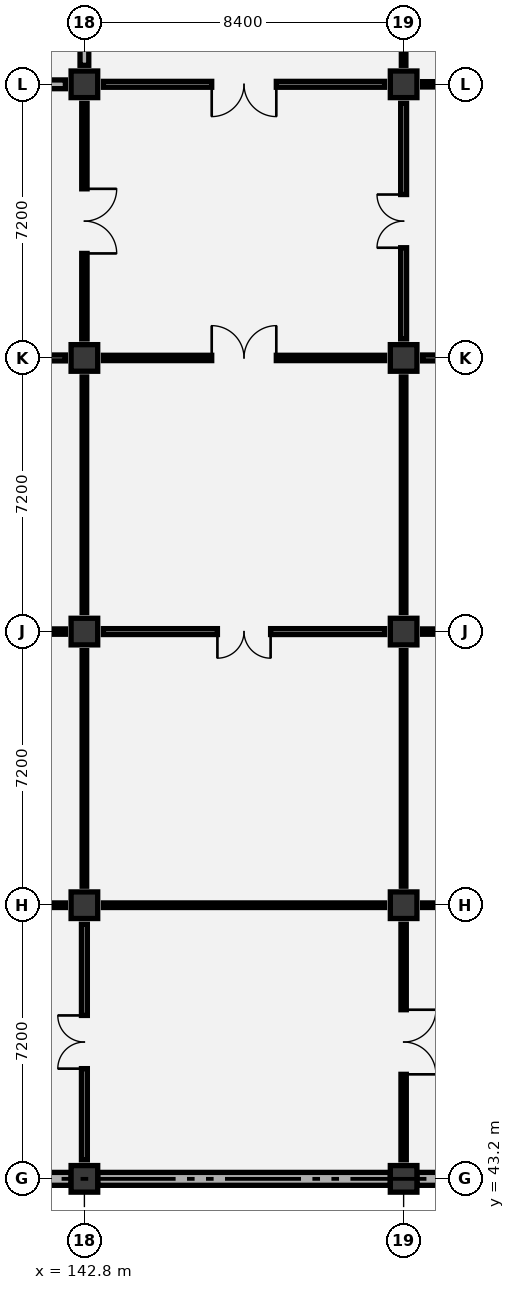
"""IFC4 building model, lengths in metres.
Left out: names, types, materials, properties, quantities, classifications, styles, units other than length and angle.
Written with IfcOpenShell. Run it as: python <this file> out.ifc"""

import sys

from ifc_helpers import new_model, si_unit, direction, frame, frame_2d, origin, origin_2d, place, context, subcontext, project, spatial, rectangle, extrude, element, fill, save


model = new_model("IFC4")
c1 = context("Model", 3, precision=1e-05, world=origin(), true_north=direction((0.0, 1.0)))
c2 = subcontext(c1, "Body", "Model", "MODEL_VIEW")
j1 = project(units=[si_unit("LENGTHUNIT", "METRE"), si_unit("PLANEANGLEUNIT", "RADIAN")], contexts=[c1])
p1 = place(None, origin())
s1 = spatial("IfcSite", under=j1, at=p1, CompositionType="ELEMENT")
p2 = place(p1, origin())
s2 = spatial("IfcBuilding", under=s1, at=p2, CompositionType="ELEMENT")
p3 = place(p2, frame((0.0, 0.0, 6.0)))
s3 = spatial("IfcBuildingStorey", under=s2, at=p3, CompositionType="ELEMENT", Elevation=6.0)
for number, where, z_axis, x_axis in (
    (1, (142.8, 43.2, 0.0), (0.0, 0.0, 1.0), (1.0, 0.0, 0.0)),
    (2, (142.8, 50.4, 0.0), (0.0, 0.0, 1.0), (1.0, 0.0, 0.0)),
    (3, (142.8, 57.6, 0.0), (0.0, 0.0, 1.0), (1.0, 0.0, 0.0)),
    (4, (142.8, 64.8, 0.0), (0.0, 0.0, 1.0), (1.0, 0.0, 0.0)),
    (5, (142.8, 72.0, 0.0), (0.0, 0.0, 1.0), (1.0, 0.0, 0.0)),
    (6, (151.2, 43.2, 0.0), (0.0, 0.0, 1.0), (1.0, 0.0, 0.0)),
    (7, (151.2, 50.4, 0.0), (0.0, 0.0, 1.0), (1.0, 0.0, 0.0)),
    (8, (151.2, 57.6, 0.0), (0.0, 0.0, 1.0), (1.0, 0.0, 0.0)),
    (9, (151.2, 64.8, 0.0), (0.0, 0.0, 1.0), (1.0, 0.0, 0.0)),
    (10, (151.2, 72.0, 0.0), (0.0, 0.0, 1.0), (1.0, 0.0, 0.0)),
):
    element("IfcColumn", number, at=place(p3, frame(where, z_axis=z_axis, x_axis=x_axis)), inside=s3, PredefinedType="COLUMN", context=c2, shape_type="SweptSolid", body=[
        extrude(rectangle(XDim=0.7, YDim=0.7, at=origin_2d()), origin(), (0.0, 0.0, 1.0), 5.4),
    ])
p4 = place(p3, frame((134.75, 43.2, 0.0), z_axis=(0.0, 0.0, 1.0), x_axis=(1.0, 0.0, 0.0)))
e11 = element("IfcWall", 11, at=p4, inside=s3, PredefinedType="SOLIDWALL", context=c2, shape_type="SweptSolid", body=[
    extrude(rectangle(XDim=7.7, YDim=0.34, at=frame_2d((3.85, 0.0))), origin(), (0.0, 0.0, 1.0), 4.42),
])
p5 = place(p3, frame((143.15, 43.2, 0.0), z_axis=(0.0, 0.0, 1.0), x_axis=(1.0, 0.0, 0.0)))
e12 = element("IfcWall", 12, at=p5, inside=s3, PredefinedType="SOLIDWALL", context=c2, shape_type="SweptSolid", body=[
    extrude(rectangle(XDim=7.7, YDim=0.34, at=frame_2d((3.85, 0.0))), origin(), (0.0, 0.0, 1.0), 4.42),
])
p6 = place(p3, frame((151.55, 43.2, 0.0), z_axis=(0.0, 0.0, 1.0), x_axis=(1.0, 0.0, 0.0)))
e13 = element("IfcWall", 13, at=p6, inside=s3, PredefinedType="SOLIDWALL", context=c2, shape_type="SweptSolid", body=[
    extrude(rectangle(XDim=7.7, YDim=0.34, at=frame_2d((3.85, 0.0))), origin(), (0.0, 0.0, 1.0), 4.42),
])
p7 = place(p3, frame((142.8, 43.7, 0.0), z_axis=(0.0, 0.0, 1.0), x_axis=(0.0, 1.0, 0.0)))
e14 = element("IfcWall", 14, at=p7, inside=s3, PredefinedType="PARTITIONING", context=c2, shape_type="SweptSolid", body=[
    extrude(rectangle(XDim=6.2, YDim=0.155, at=frame_2d((3.1, 0.0))), origin(), (0.0, 0.0, 1.0), 4.67),
])
p8 = place(p7, frame((2.4, 0.0, 0.0)))
e15 = element("IfcOpeningElement", 15, at=p8, cuts=e14, PredefinedType="OPENING", context=c2, shape_type="SweptSolid", body=[
    extrude(rectangle(XDim=1.4, YDim=2.15, at=frame_2d((0.7, 1.075))), frame((0.0, 0.087, 0.0), z_axis=(0.0, -1.0, 0.0), x_axis=(1.0, 0.0, 0.0)), (0.0, 0.0, 1.0), 0.175),
])
p9 = place(p3, frame((134.9, 50.4, 0.0), z_axis=(0.0, 0.0, 1.0), x_axis=(1.0, 0.0, 0.0)))
e16 = element("IfcWall", 16, at=p9, inside=s3, PredefinedType="PARTITIONING", context=c2, shape_type="SweptSolid", body=[
    extrude(rectangle(XDim=7.4, YDim=0.12, at=frame_2d((3.7, 0.0))), origin(), (0.0, 0.0, 1.0), 4.27),
])
p10 = place(p3, frame((142.8, 50.9, 0.0), z_axis=(0.0, 0.0, 1.0), x_axis=(0.0, 1.0, 0.0)))
e17 = element("IfcWall", 17, at=p10, inside=s3, PredefinedType="PARTITIONING", context=c2, shape_type="SweptSolid", body=[
    extrude(rectangle(XDim=6.2, YDim=0.12, at=frame_2d((3.1, 0.0))), origin(), (0.0, 0.0, 1.0), 4.32),
])
p11 = place(p3, frame((134.9, 57.6, 0.0), z_axis=(0.0, 0.0, 1.0), x_axis=(1.0, 0.0, 0.0)))
e18 = element("IfcWall", 18, at=p11, inside=s3, PredefinedType="PARTITIONING", context=c2, shape_type="SweptSolid", body=[
    extrude(rectangle(XDim=7.4, YDim=0.14, at=frame_2d((3.7, 0.0))), origin(), (0.0, 0.0, 1.0), 4.27),
])
p12 = place(p11, frame((2.85, 0.0, 0.0)))
e19 = element("IfcOpeningElement", 19, at=p12, cuts=e18, PredefinedType="OPENING", context=c2, shape_type="SweptSolid", body=[
    extrude(rectangle(XDim=1.7, YDim=2.25, at=frame_2d((0.85, 1.125))), frame((0.0, 0.08, 0.0), z_axis=(0.0, -1.0, 0.0), x_axis=(1.0, 0.0, 0.0)), (0.0, 0.0, 1.0), 0.16),
])
p13 = place(p3, frame((142.8, 58.1, 0.0), z_axis=(0.0, 0.0, 1.0), x_axis=(0.0, 1.0, 0.0)))
e20 = element("IfcWall", 20, at=p13, inside=s3, PredefinedType="PARTITIONING", context=c2, shape_type="SweptSolid", body=[
    extrude(rectangle(XDim=6.2, YDim=0.12, at=frame_2d((3.1, 0.0))), origin(), (0.0, 0.0, 1.0), 4.78),
])
p14 = place(p3, frame((134.9, 64.8, 0.0), z_axis=(0.0, 0.0, 1.0), x_axis=(1.0, 0.0, 0.0)))
e21 = element("IfcWall", 21, at=p14, inside=s3, PredefinedType="PARTITIONING", context=c2, shape_type="SweptSolid", body=[
    extrude(rectangle(XDim=7.4, YDim=0.155, at=frame_2d((3.7, 0.0))), origin(), (0.0, 0.0, 1.0), 4.27),
])
p15 = place(p14, frame((3.0, 0.0, 0.0)))
e22 = element("IfcOpeningElement", 22, at=p15, cuts=e21, PredefinedType="OPENING", context=c2, shape_type="SweptSolid", body=[
    extrude(rectangle(XDim=1.4, YDim=2.15, at=frame_2d((0.7, 1.075))), frame((0.0, 0.087, 0.0), z_axis=(0.0, -1.0, 0.0), x_axis=(1.0, 0.0, 0.0)), (0.0, 0.0, 1.0), 0.175),
])
p16 = place(p3, frame((142.8, 65.3, 0.0), z_axis=(0.0, 0.0, 1.0), x_axis=(0.0, 1.0, 0.0)))
e23 = element("IfcWall", 23, at=p16, inside=s3, PredefinedType="PARTITIONING", context=c2, shape_type="SweptSolid", body=[
    extrude(rectangle(XDim=6.2, YDim=0.14, at=frame_2d((3.1, 0.0))), origin(), (0.0, 0.0, 1.0), 4.32),
])
p17 = place(p16, frame((2.25, 0.0, 0.0)))
e24 = element("IfcOpeningElement", 24, at=p17, cuts=e23, PredefinedType="OPENING", context=c2, shape_type="SweptSolid", body=[
    extrude(rectangle(XDim=1.7, YDim=2.25, at=frame_2d((0.85, 1.125))), frame((0.0, 0.08, 0.0), z_axis=(0.0, -1.0, 0.0), x_axis=(1.0, 0.0, 0.0)), (0.0, 0.0, 1.0), 0.16),
])
p18 = place(p3, frame((134.9, 72.0, 0.0), z_axis=(0.0, 0.0, 1.0), x_axis=(1.0, 0.0, 0.0)))
e25 = element("IfcWall", 25, at=p18, inside=s3, PredefinedType="PARTITIONING", context=c2, shape_type="SweptSolid", body=[
    extrude(rectangle(XDim=7.4, YDim=0.23, at=frame_2d((3.7, 0.0))), origin(), (0.0, 0.0, 1.0), 4.27),
])
p19 = place(p18, frame((2.95, 0.0, 0.0)))
e26 = element("IfcOpeningElement", 26, at=p19, cuts=e25, PredefinedType="OPENING", context=c2, shape_type="SweptSolid", body=[
    extrude(rectangle(XDim=1.5, YDim=2.15, at=frame_2d((0.75, 1.075))), frame((0.0, 0.125, 0.0), z_axis=(0.0, -1.0, 0.0), x_axis=(1.0, 0.0, 0.0)), (0.0, 0.0, 1.0), 0.25),
])
p20 = place(p3, frame((142.8, 72.5, 0.0), z_axis=(0.0, 0.0, 1.0), x_axis=(0.0, 1.0, 0.0)))
e27 = element("IfcWall", 27, at=p20, inside=s3, PredefinedType="PARTITIONING", context=c2, shape_type="SweptSolid", body=[
    extrude(rectangle(XDim=6.2, YDim=0.23, at=frame_2d((3.1, 0.0))), origin(), (0.0, 0.0, 1.0), 4.57),
])
p21 = place(p3, frame((151.2, 43.7, 0.0), z_axis=(0.0, 0.0, 1.0), x_axis=(0.0, 1.0, 0.0)))
e28 = element("IfcWall", 28, at=p21, inside=s3, PredefinedType="PARTITIONING", context=c2, shape_type="SweptSolid", body=[
    extrude(rectangle(XDim=6.2, YDim=0.14, at=frame_2d((3.1, 0.0))), origin(), (0.0, 0.0, 1.0), 4.32),
])
p22 = place(p21, frame((2.25, 0.0, 0.0)))
e29 = element("IfcOpeningElement", 29, at=p22, cuts=e28, PredefinedType="OPENING", context=c2, shape_type="SweptSolid", body=[
    extrude(rectangle(XDim=1.7, YDim=2.25, at=frame_2d((0.85, 1.125))), frame((0.0, 0.08, 0.0), z_axis=(0.0, -1.0, 0.0), x_axis=(1.0, 0.0, 0.0)), (0.0, 0.0, 1.0), 0.16),
])
p23 = place(p3, frame((143.3, 50.4, 0.0), z_axis=(0.0, 0.0, 1.0), x_axis=(1.0, 0.0, 0.0)))
e30 = element("IfcWall", 30, at=p23, inside=s3, PredefinedType="PARTITIONING", context=c2, shape_type="SweptSolid", body=[
    extrude(rectangle(XDim=7.4, YDim=0.12, at=frame_2d((3.7, 0.0))), origin(), (0.0, 0.0, 1.0), 4.27),
])
p24 = place(p3, frame((151.2, 50.9, 0.0), z_axis=(0.0, 0.0, 1.0), x_axis=(0.0, 1.0, 0.0)))
e31 = element("IfcWall", 31, at=p24, inside=s3, PredefinedType="PARTITIONING", context=c2, shape_type="SweptSolid", body=[
    extrude(rectangle(XDim=6.2, YDim=0.12, at=frame_2d((3.1, 0.0))), origin(), (0.0, 0.0, 1.0), 4.78),
])
p25 = place(p3, frame((143.3, 57.6, 0.0), z_axis=(0.0, 0.0, 1.0), x_axis=(1.0, 0.0, 0.0)))
e32 = element("IfcWall", 32, at=p25, inside=s3, PredefinedType="PARTITIONING", context=c2, shape_type="SweptSolid", body=[
    extrude(rectangle(XDim=7.4, YDim=0.155, at=frame_2d((3.7, 0.0))), origin(), (0.0, 0.0, 1.0), 4.27),
])
p26 = place(p25, frame((3.0, 0.0, 0.0)))
e33 = element("IfcOpeningElement", 33, at=p26, cuts=e32, PredefinedType="OPENING", context=c2, shape_type="SweptSolid", body=[
    extrude(rectangle(XDim=1.4, YDim=2.15, at=frame_2d((0.7, 1.075))), frame((0.0, 0.087, 0.0), z_axis=(0.0, -1.0, 0.0), x_axis=(1.0, 0.0, 0.0)), (0.0, 0.0, 1.0), 0.175),
])
p27 = place(p3, frame((151.2, 58.1, 0.0), z_axis=(0.0, 0.0, 1.0), x_axis=(0.0, 1.0, 0.0)))
e34 = element("IfcWall", 34, at=p27, inside=s3, PredefinedType="PARTITIONING", context=c2, shape_type="SweptSolid", body=[
    extrude(rectangle(XDim=6.2, YDim=0.12, at=frame_2d((3.1, 0.0))), origin(), (0.0, 0.0, 1.0), 4.32),
])
p28 = place(p3, frame((143.3, 64.8, 0.0), z_axis=(0.0, 0.0, 1.0), x_axis=(1.0, 0.0, 0.0)))
e35 = element("IfcWall", 35, at=p28, inside=s3, PredefinedType="PARTITIONING", context=c2, shape_type="SweptSolid", body=[
    extrude(rectangle(XDim=7.4, YDim=0.14, at=frame_2d((3.7, 0.0))), origin(), (0.0, 0.0, 1.0), 4.27),
])
p29 = place(p28, frame((2.85, 0.0, 0.0)))
e36 = element("IfcOpeningElement", 36, at=p29, cuts=e35, PredefinedType="OPENING", context=c2, shape_type="SweptSolid", body=[
    extrude(rectangle(XDim=1.7, YDim=2.25, at=frame_2d((0.85, 1.125))), frame((0.0, 0.08, 0.0), z_axis=(0.0, -1.0, 0.0), x_axis=(1.0, 0.0, 0.0)), (0.0, 0.0, 1.0), 0.16),
])
p30 = place(p3, frame((151.2, 65.3, 0.0), z_axis=(0.0, 0.0, 1.0), x_axis=(0.0, 1.0, 0.0)))
e37 = element("IfcWall", 37, at=p30, inside=s3, PredefinedType="PARTITIONING", context=c2, shape_type="SweptSolid", body=[
    extrude(rectangle(XDim=6.2, YDim=0.155, at=frame_2d((3.1, 0.0))), origin(), (0.0, 0.0, 1.0), 4.57),
])
p31 = place(p30, frame((2.4, 0.0, 0.0)))
e38 = element("IfcOpeningElement", 38, at=p31, cuts=e37, PredefinedType="OPENING", context=c2, shape_type="SweptSolid", body=[
    extrude(rectangle(XDim=1.4, YDim=2.15, at=frame_2d((0.7, 1.075))), frame((0.0, 0.087, 0.0), z_axis=(0.0, -1.0, 0.0), x_axis=(1.0, 0.0, 0.0)), (0.0, 0.0, 1.0), 0.175),
])
p32 = place(p3, frame((143.3, 72.0, 0.0), z_axis=(0.0, 0.0, 1.0), x_axis=(1.0, 0.0, 0.0)))
e39 = element("IfcWall", 39, at=p32, inside=s3, PredefinedType="PARTITIONING", context=c2, shape_type="SweptSolid", body=[
    extrude(rectangle(XDim=7.4, YDim=0.155, at=frame_2d((3.7, 0.0))), origin(), (0.0, 0.0, 1.0), 4.27),
])
p33 = place(p32, frame((2.85, 0.0, 0.0)))
e40 = element("IfcOpeningElement", 40, at=p33, cuts=e39, PredefinedType="OPENING", context=c2, shape_type="SweptSolid", body=[
    extrude(rectangle(XDim=1.7, YDim=2.25, at=frame_2d((0.85, 1.125))), frame((0.0, 0.087, 0.0), z_axis=(0.0, -1.0, 0.0), x_axis=(1.0, 0.0, 0.0)), (0.0, 0.0, 1.0), 0.175),
])
p34 = place(p3, frame((151.2, 72.5, 0.0), z_axis=(0.0, 0.0, 1.0), x_axis=(0.0, 1.0, 0.0)))
e41 = element("IfcWall", 41, at=p34, inside=s3, PredefinedType="PARTITIONING", context=c2, shape_type="SweptSolid", body=[
    extrude(rectangle(XDim=6.2, YDim=0.12, at=frame_2d((3.1, 0.0))), origin(), (0.0, 0.0, 1.0), 4.32),
])
p35 = place(p3, frame((151.7, 50.4, 0.0), z_axis=(0.0, 0.0, 1.0), x_axis=(1.0, 0.0, 0.0)))
e42 = element("IfcWall", 42, at=p35, inside=s3, PredefinedType="PARTITIONING", context=c2, shape_type="SweptSolid", body=[
    extrude(rectangle(XDim=7.4, YDim=0.12, at=frame_2d((3.7, 0.0))), origin(), (0.0, 0.0, 1.0), 4.27),
])
p36 = place(p3, frame((151.7, 57.6, 0.0), z_axis=(0.0, 0.0, 1.0), x_axis=(1.0, 0.0, 0.0)))
e43 = element("IfcWall", 43, at=p36, inside=s3, PredefinedType="PARTITIONING", context=c2, shape_type="SweptSolid", body=[
    extrude(rectangle(XDim=7.4, YDim=0.14, at=frame_2d((3.7, 0.0))), origin(), (0.0, 0.0, 1.0), 4.27),
])
p37 = place(p36, frame((2.85, 0.0, 0.0)))
e44 = element("IfcOpeningElement", 44, at=p37, cuts=e43, PredefinedType="OPENING", context=c2, shape_type="SweptSolid", body=[
    extrude(rectangle(XDim=1.7, YDim=2.25, at=frame_2d((0.85, 1.125))), frame((0.0, 0.08, 0.0), z_axis=(0.0, -1.0, 0.0), x_axis=(1.0, 0.0, 0.0)), (0.0, 0.0, 1.0), 0.16),
])
p38 = place(p3, frame((151.7, 64.8, 0.0), z_axis=(0.0, 0.0, 1.0), x_axis=(1.0, 0.0, 0.0)))
e45 = element("IfcWall", 45, at=p38, inside=s3, PredefinedType="PARTITIONING", context=c2, shape_type="SweptSolid", body=[
    extrude(rectangle(XDim=7.4, YDim=0.155, at=frame_2d((3.7, 0.0))), origin(), (0.0, 0.0, 1.0), 4.27),
])
p39 = place(p38, frame((3.0, 0.0, 0.0)))
e46 = element("IfcOpeningElement", 46, at=p39, cuts=e45, PredefinedType="OPENING", context=c2, shape_type="SweptSolid", body=[
    extrude(rectangle(XDim=1.4, YDim=2.15, at=frame_2d((0.7, 1.075))), frame((0.0, 0.087, 0.0), z_axis=(0.0, -1.0, 0.0), x_axis=(1.0, 0.0, 0.0)), (0.0, 0.0, 1.0), 0.175),
])
p40 = place(p3, frame((151.7, 72.0, 0.0), z_axis=(0.0, 0.0, 1.0), x_axis=(1.0, 0.0, 0.0)))
e47 = element("IfcWall", 47, at=p40, inside=s3, PredefinedType="PARTITIONING", context=c2, shape_type="SweptSolid", body=[
    extrude(rectangle(XDim=7.4, YDim=0.14, at=frame_2d((3.7, 0.0))), origin(), (0.0, 0.0, 1.0), 4.27),
])
p41 = place(p40, frame((3.0, 0.0, 0.0)))
e48 = element("IfcOpeningElement", 48, at=p41, cuts=e47, PredefinedType="OPENING", context=c2, shape_type="SweptSolid", body=[
    extrude(rectangle(XDim=1.4, YDim=2.15, at=frame_2d((0.7, 1.075))), frame((0.0, 0.08, 0.0), z_axis=(0.0, -1.0, 0.0), x_axis=(1.0, 0.0, 0.0)), (0.0, 0.0, 1.0), 0.16),
])
p42 = place(p8, origin())
e49 = element("IfcDoor", 49, at=p42, inside=s3, OperationType="DOUBLE_DOOR_SINGLE_SWING", PredefinedType="DOOR", context=c2, shape_type="SweptSolid", body=[
    extrude(rectangle(XDim=1.4, YDim=2.15, at=frame_2d((0.7, 1.075))), frame((0.0, 0.025, 0.0), z_axis=(0.0, -1.0, 0.0), x_axis=(1.0, 0.0, 0.0)), (0.0, 0.0, 1.0), 0.05),
])
fill(e15, e49)
p43 = place(p17, frame((1.7, 0.0, 0.0), z_axis=(0.0, 0.0, 1.0), x_axis=(-1.0, 0.0, 0.0)))
e50 = element("IfcDoor", 50, at=p43, inside=s3, OperationType="DOUBLE_DOOR_SINGLE_SWING", PredefinedType="DOOR", context=c2, shape_type="SweptSolid", body=[
    extrude(rectangle(XDim=1.7, YDim=2.25, at=frame_2d((0.85, 1.125))), frame((0.0, 0.025, 0.0), z_axis=(0.0, -1.0, 0.0), x_axis=(1.0, 0.0, 0.0)), (0.0, 0.0, 1.0), 0.05),
])
fill(e24, e50)
p44 = place(p22, frame((1.7, 0.0, 0.0), z_axis=(0.0, 0.0, 1.0), x_axis=(-1.0, 0.0, 0.0)))
e51 = element("IfcDoor", 51, at=p44, inside=s3, OperationType="DOUBLE_DOOR_SINGLE_SWING", PredefinedType="DOOR", context=c2, shape_type="SweptSolid", body=[
    extrude(rectangle(XDim=1.7, YDim=2.25, at=frame_2d((0.85, 1.125))), frame((0.0, 0.025, 0.0), z_axis=(0.0, -1.0, 0.0), x_axis=(1.0, 0.0, 0.0)), (0.0, 0.0, 1.0), 0.05),
])
fill(e29, e51)
p45 = place(p26, frame((1.4, 0.0, 0.0), z_axis=(0.0, 0.0, 1.0), x_axis=(-1.0, 0.0, 0.0)))
e52 = element("IfcDoor", 52, at=p45, inside=s3, OperationType="DOUBLE_DOOR_SINGLE_SWING", PredefinedType="DOOR", context=c2, shape_type="SweptSolid", body=[
    extrude(rectangle(XDim=1.4, YDim=2.15, at=frame_2d((0.7, 1.075))), frame((0.0, 0.025, 0.0), z_axis=(0.0, -1.0, 0.0), x_axis=(1.0, 0.0, 0.0)), (0.0, 0.0, 1.0), 0.05),
])
fill(e33, e52)
p46 = place(p29, origin())
e53 = element("IfcDoor", 53, at=p46, inside=s3, OperationType="DOUBLE_DOOR_SINGLE_SWING", PredefinedType="DOOR", context=c2, shape_type="SweptSolid", body=[
    extrude(rectangle(XDim=1.7, YDim=2.25, at=frame_2d((0.85, 1.125))), frame((0.0, 0.025, 0.0), z_axis=(0.0, -1.0, 0.0), x_axis=(1.0, 0.0, 0.0)), (0.0, 0.0, 1.0), 0.05),
])
fill(e36, e53)
p47 = place(p31, origin())
e54 = element("IfcDoor", 54, at=p47, inside=s3, OperationType="DOUBLE_DOOR_SINGLE_SWING", PredefinedType="DOOR", context=c2, shape_type="SweptSolid", body=[
    extrude(rectangle(XDim=1.4, YDim=2.15, at=frame_2d((0.7, 1.075))), frame((0.0, 0.025, 0.0), z_axis=(0.0, -1.0, 0.0), x_axis=(1.0, 0.0, 0.0)), (0.0, 0.0, 1.0), 0.05),
])
fill(e38, e54)
p48 = place(p33, frame((1.7, 0.0, 0.0), z_axis=(0.0, 0.0, 1.0), x_axis=(-1.0, 0.0, 0.0)))
e55 = element("IfcDoor", 55, at=p48, inside=s3, OperationType="DOUBLE_DOOR_SINGLE_SWING", PredefinedType="DOOR", context=c2, shape_type="SweptSolid", body=[
    extrude(rectangle(XDim=1.7, YDim=2.25, at=frame_2d((0.85, 1.125))), frame((0.0, 0.025, 0.0), z_axis=(0.0, -1.0, 0.0), x_axis=(1.0, 0.0, 0.0)), (0.0, 0.0, 1.0), 0.05),
])
fill(e40, e55)
save(model, sys.argv[1])
